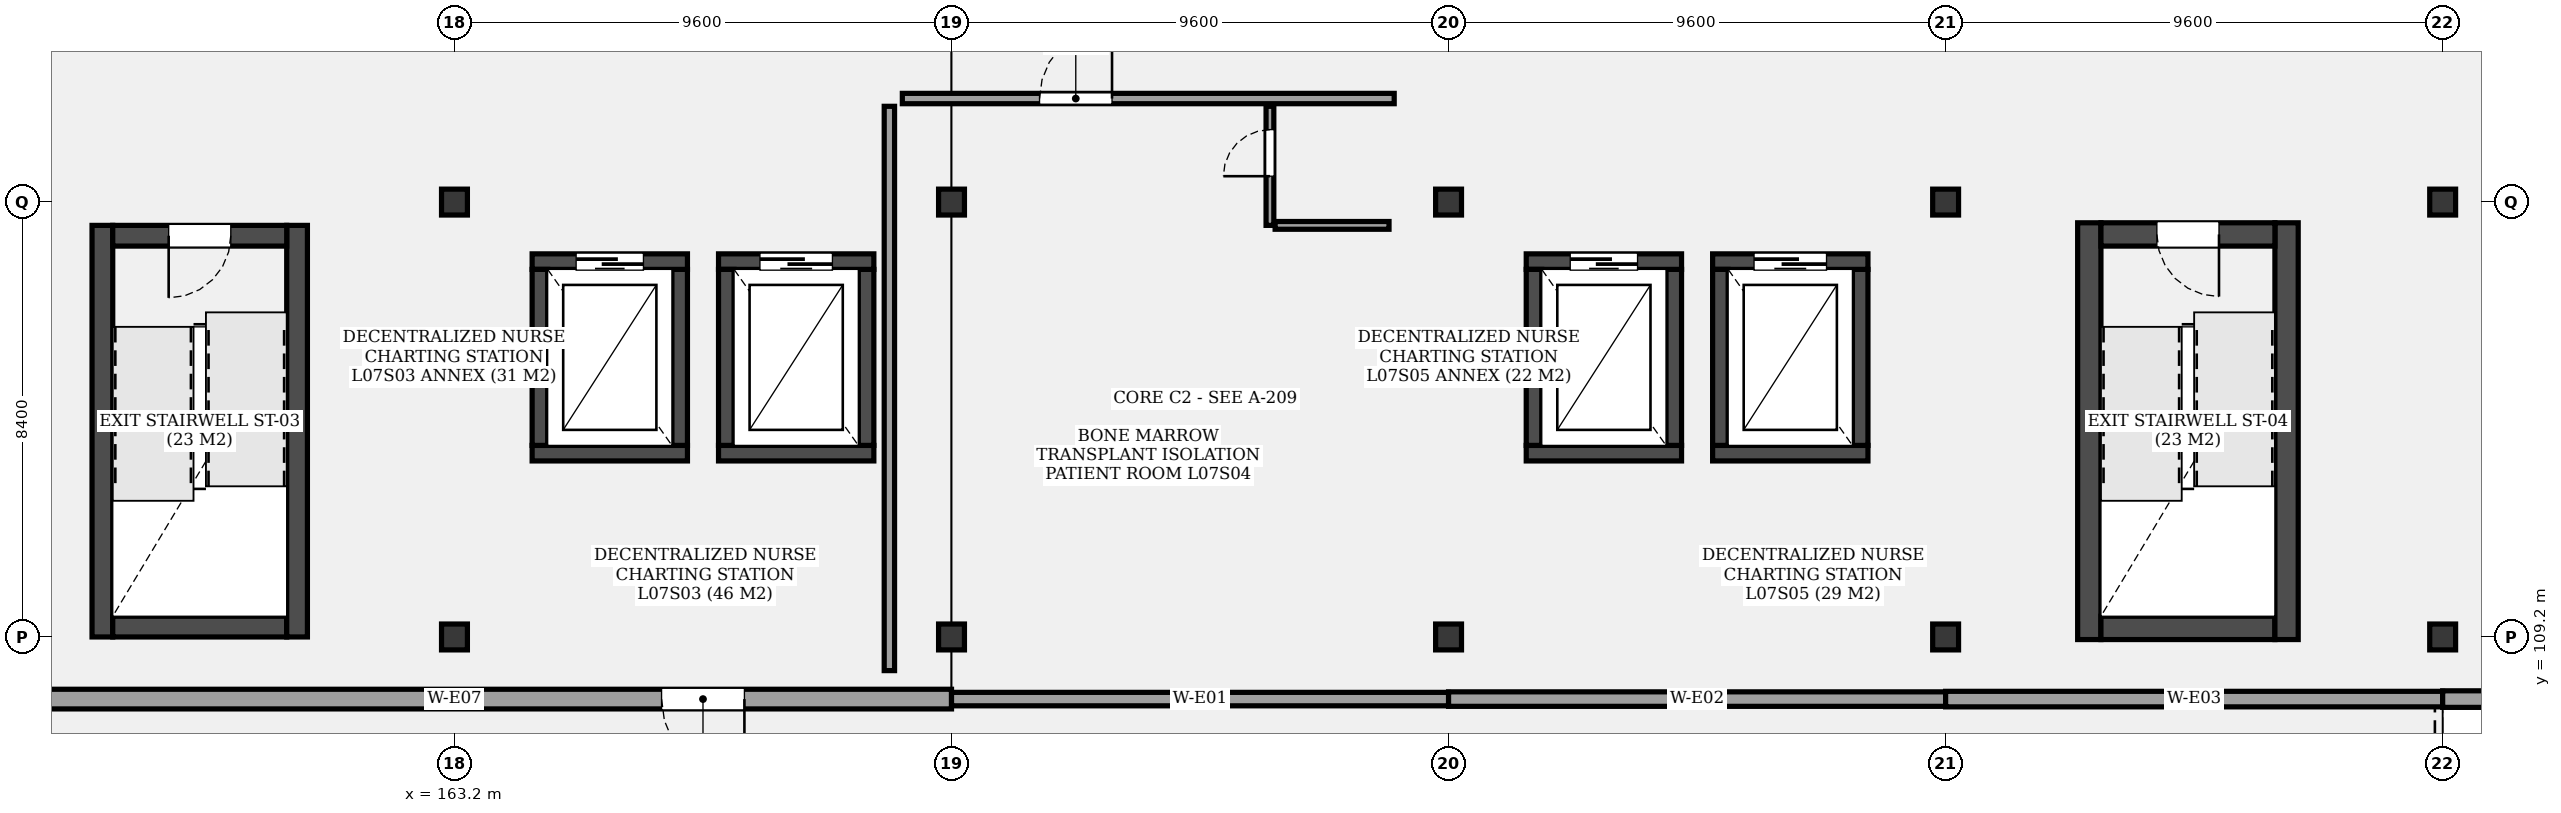
"""IFC4 building model, lengths in metres.
Left out: names, types, materials, properties, quantities, classifications, styles, units other than length and angle.
Written with IfcOpenShell. Run it as: python <this file> out.ifc"""

import sys

from ifc_helpers import new_model, si_unit, direction, frame, frame_2d, origin, origin_2d, place, context, subcontext, project, spatial, rectangle, extrude, element, fill, save


model = new_model("IFC4")
c1 = context("Model", 3, precision=1e-05, world=origin(), true_north=direction((0.0, 1.0)))
c2 = subcontext(c1, "Body", "Model", "MODEL_VIEW")
j1 = project(units=[si_unit("LENGTHUNIT", "METRE"), si_unit("PLANEANGLEUNIT", "RADIAN")], contexts=[c1])
p1 = place(None, origin())
s1 = spatial("IfcSite", under=j1, at=p1, CompositionType="ELEMENT")
p2 = place(p1, origin())
s2 = spatial("IfcBuilding", under=s1, at=p2, CompositionType="ELEMENT")
p3 = place(p2, frame((0.0, 0.0, 30.4)))
s3 = spatial("IfcBuildingStorey", under=s2, at=p3, CompositionType="ELEMENT", Elevation=30.4)
for number, where, z_axis, x_axis in (
    (1, (163.2, 109.2, 0.0), (0.0, 0.0, 1.0), (1.0, 0.0, 0.0)),
    (2, (163.2, 117.6, 0.0), (0.0, 0.0, 1.0), (1.0, 0.0, 0.0)),
    (3, (172.8, 109.2, 0.0), (0.0, 0.0, 1.0), (1.0, 0.0, 0.0)),
    (4, (172.8, 117.6, 0.0), (0.0, 0.0, 1.0), (1.0, 0.0, 0.0)),
    (5, (182.4, 109.2, 0.0), (0.0, 0.0, 1.0), (1.0, 0.0, 0.0)),
    (6, (182.4, 117.6, 0.0), (0.0, 0.0, 1.0), (1.0, 0.0, 0.0)),
    (7, (192.0, 109.2, 0.0), (0.0, 0.0, 1.0), (1.0, 0.0, 0.0)),
    (8, (192.0, 117.6, 0.0), (0.0, 0.0, 1.0), (1.0, 0.0, 0.0)),
    (9, (201.6, 109.2, 0.0), (0.0, 0.0, 1.0), (1.0, 0.0, 0.0)),
    (10, (201.6, 117.6, 0.0), (0.0, 0.0, 1.0), (1.0, 0.0, 0.0)),
):
    element("IfcColumn", number, at=place(p3, frame(where, z_axis=z_axis, x_axis=x_axis)), inside=s3, PredefinedType="COLUMN", context=c2, shape_type="SweptSolid", body=[
        extrude(rectangle(XDim=0.5, YDim=0.5, at=origin_2d()), origin(), (0.0, 0.0, 1.0), 4.2),
    ])
p4 = place(p3, frame((156.4, 117.15, 0.0), z_axis=(0.0, 0.0, 1.0), x_axis=(0.0, -1.0, 0.0)))
e11 = element("IfcWall", 11, at=p4, inside=s3, PredefinedType="SHEAR", context=c2, shape_type="SweptSolid", body=[
    extrude(rectangle(XDim=7.95, YDim=0.4, at=frame_2d((3.975, 0.0))), origin(), (0.0, 0.0, 1.0), 4.2),
])
p5 = place(p3, frame((156.6, 109.4, 0.0), z_axis=(0.0, 0.0, 1.0), x_axis=(1.0, 0.0, 0.0)))
e12 = element("IfcWall", 12, at=p5, inside=s3, PredefinedType="SHEAR", context=c2, shape_type="SweptSolid", body=[
    extrude(rectangle(XDim=3.36, YDim=0.4, at=frame_2d((1.68, 0.0))), origin(), (0.0, 0.0, 1.0), 4.2),
])
p6 = place(p3, frame((160.16, 109.2, 0.0), z_axis=(0.0, 0.0, 1.0), x_axis=(0.0, 1.0, 0.0)))
e13 = element("IfcWall", 13, at=p6, inside=s3, PredefinedType="SHEAR", context=c2, shape_type="SweptSolid", body=[
    extrude(rectangle(XDim=7.95, YDim=0.4, at=frame_2d((3.975, 0.0))), origin(), (0.0, 0.0, 1.0), 4.2),
])
p7 = place(p3, frame((159.96, 116.95, 0.0), z_axis=(0.0, 0.0, 1.0), x_axis=(-1.0, 0.0, 0.0)))
e14 = element("IfcWall", 14, at=p7, inside=s3, PredefinedType="SHEAR", context=c2, shape_type="SweptSolid", body=[
    extrude(rectangle(XDim=3.36, YDim=0.4, at=frame_2d((1.68, 0.0))), origin(), (0.0, 0.0, 1.0), 4.2),
])
p8 = place(p7, frame((1.08, 0.0, 0.0)))
e15 = element("IfcOpeningElement", 15, at=p8, cuts=e14, PredefinedType="OPENING", context=c2, shape_type="SweptSolid", body=[
    extrude(rectangle(XDim=1.2, YDim=2.2, at=frame_2d((0.6, 1.1))), frame((0.0, 0.21, 0.0), z_axis=(0.0, -1.0, 0.0), x_axis=(1.0, 0.0, 0.0)), (0.0, 0.0, 1.0), 0.42),
])
p9 = place(p3, frame((194.775, 117.2, 0.0), z_axis=(0.0, 0.0, 1.0), x_axis=(0.0, -1.0, 0.0)))
e16 = element("IfcWall", 16, at=p9, inside=s3, PredefinedType="SHEAR", context=c2, shape_type="SweptSolid", body=[
    extrude(rectangle(XDim=8.05, YDim=0.45, at=frame_2d((4.025, 0.0))), origin(), (0.0, 0.0, 1.0), 4.2),
])
p10 = place(p3, frame((195.0, 109.375, 0.0), z_axis=(0.0, 0.0, 1.0), x_axis=(1.0, 0.0, 0.0)))
e17 = element("IfcWall", 17, at=p10, inside=s3, PredefinedType="SHEAR", context=c2, shape_type="SweptSolid", body=[
    extrude(rectangle(XDim=3.36, YDim=0.45, at=frame_2d((1.68, 0.0))), origin(), (0.0, 0.0, 1.0), 4.2),
])
p11 = place(p3, frame((198.585, 109.15, 0.0), z_axis=(0.0, 0.0, 1.0), x_axis=(0.0, 1.0, 0.0)))
e18 = element("IfcWall", 18, at=p11, inside=s3, PredefinedType="SHEAR", context=c2, shape_type="SweptSolid", body=[
    extrude(rectangle(XDim=8.05, YDim=0.45, at=frame_2d((4.025, 0.0))), origin(), (0.0, 0.0, 1.0), 4.2),
])
p12 = place(p3, frame((198.36, 116.975, 0.0), z_axis=(0.0, 0.0, 1.0), x_axis=(-1.0, 0.0, 0.0)))
e19 = element("IfcWall", 19, at=p12, inside=s3, PredefinedType="SHEAR", context=c2, shape_type="SweptSolid", body=[
    extrude(rectangle(XDim=3.36, YDim=0.45, at=frame_2d((1.68, 0.0))), origin(), (0.0, 0.0, 1.0), 4.2),
])
p13 = place(p12, frame((1.08, 0.0, 0.0)))
e20 = element("IfcOpeningElement", 20, at=p13, cuts=e19, PredefinedType="OPENING", context=c2, shape_type="SweptSolid", body=[
    extrude(rectangle(XDim=1.2, YDim=2.2, at=frame_2d((0.6, 1.1))), frame((0.0, 0.235, 0.0), z_axis=(0.0, -1.0, 0.0), x_axis=(1.0, 0.0, 0.0)), (0.0, 0.0, 1.0), 0.47),
])
p14 = place(p3, frame((164.7, 112.75, 0.0), z_axis=(0.0, 0.0, 1.0), x_axis=(1.0, 0.0, 0.0)))
e21 = element("IfcWall", 21, at=p14, inside=s3, PredefinedType="SHEAR", context=c2, shape_type="SweptSolid", body=[
    extrude(rectangle(XDim=3.0, YDim=0.3, at=frame_2d((1.5, 0.0))), origin(), (0.0, 0.0, 1.0), 4.2),
])
p15 = place(p3, frame((167.55, 112.9, 0.0), z_axis=(0.0, 0.0, 1.0), x_axis=(0.0, 1.0, 0.0)))
e22 = element("IfcWall", 22, at=p15, inside=s3, PredefinedType="SHEAR", context=c2, shape_type="SweptSolid", body=[
    extrude(rectangle(XDim=3.4, YDim=0.3, at=frame_2d((1.7, 0.0))), origin(), (0.0, 0.0, 1.0), 4.2),
])
p16 = place(p3, frame((167.7, 116.45, 0.0), z_axis=(0.0, 0.0, 1.0), x_axis=(-1.0, 0.0, 0.0)))
e23 = element("IfcWall", 23, at=p16, inside=s3, PredefinedType="SHEAR", context=c2, shape_type="SweptSolid", body=[
    extrude(rectangle(XDim=3.0, YDim=0.3, at=frame_2d((1.5, 0.0))), origin(), (0.0, 0.0, 1.0), 4.2),
])
p17 = place(p16, frame((0.85, 0.0, 0.0)))
e24 = element("IfcOpeningElement", 24, at=p17, cuts=e23, PredefinedType="OPENING", context=c2, shape_type="SweptSolid", body=[
    extrude(rectangle(XDim=1.3, YDim=2.3, at=frame_2d((0.65, 1.15))), frame((0.0, 0.16, 0.0), z_axis=(0.0, -1.0, 0.0), x_axis=(1.0, 0.0, 0.0)), (0.0, 0.0, 1.0), 0.32),
])
p18 = place(p3, frame((164.85, 116.3, 0.0), z_axis=(0.0, 0.0, 1.0), x_axis=(0.0, -1.0, 0.0)))
e25 = element("IfcWall", 25, at=p18, inside=s3, PredefinedType="SHEAR", context=c2, shape_type="SweptSolid", body=[
    extrude(rectangle(XDim=3.4, YDim=0.3, at=frame_2d((1.7, 0.0))), origin(), (0.0, 0.0, 1.0), 4.2),
])
p19 = place(p3, frame((168.3, 112.75, 0.0), z_axis=(0.0, 0.0, 1.0), x_axis=(1.0, 0.0, 0.0)))
e26 = element("IfcWall", 26, at=p19, inside=s3, PredefinedType="SHEAR", context=c2, shape_type="SweptSolid", body=[
    extrude(rectangle(XDim=3.0, YDim=0.3, at=frame_2d((1.5, 0.0))), origin(), (0.0, 0.0, 1.0), 4.2),
])
p20 = place(p3, frame((171.15, 112.9, 0.0), z_axis=(0.0, 0.0, 1.0), x_axis=(0.0, 1.0, 0.0)))
e27 = element("IfcWall", 27, at=p20, inside=s3, PredefinedType="SHEAR", context=c2, shape_type="SweptSolid", body=[
    extrude(rectangle(XDim=3.4, YDim=0.3, at=frame_2d((1.7, 0.0))), origin(), (0.0, 0.0, 1.0), 4.2),
])
p21 = place(p3, frame((171.3, 116.45, 0.0), z_axis=(0.0, 0.0, 1.0), x_axis=(-1.0, 0.0, 0.0)))
e28 = element("IfcWall", 28, at=p21, inside=s3, PredefinedType="SHEAR", context=c2, shape_type="SweptSolid", body=[
    extrude(rectangle(XDim=3.0, YDim=0.3, at=frame_2d((1.5, 0.0))), origin(), (0.0, 0.0, 1.0), 4.2),
])
p22 = place(p21, frame((0.8, 0.0, 0.0)))
e29 = element("IfcOpeningElement", 29, at=p22, cuts=e28, PredefinedType="OPENING", context=c2, shape_type="SweptSolid", body=[
    extrude(rectangle(XDim=1.4, YDim=2.3, at=frame_2d((0.7, 1.15))), frame((0.0, 0.16, 0.0), z_axis=(0.0, -1.0, 0.0), x_axis=(1.0, 0.0, 0.0)), (0.0, 0.0, 1.0), 0.32),
])
p23 = place(p3, frame((168.45, 116.3, 0.0), z_axis=(0.0, 0.0, 1.0), x_axis=(0.0, -1.0, 0.0)))
e30 = element("IfcWall", 30, at=p23, inside=s3, PredefinedType="SHEAR", context=c2, shape_type="SweptSolid", body=[
    extrude(rectangle(XDim=3.4, YDim=0.3, at=frame_2d((1.7, 0.0))), origin(), (0.0, 0.0, 1.0), 4.2),
])
p24 = place(p3, frame((183.9, 112.75, 0.0), z_axis=(0.0, 0.0, 1.0), x_axis=(1.0, 0.0, 0.0)))
e31 = element("IfcWall", 31, at=p24, inside=s3, PredefinedType="SHEAR", context=c2, shape_type="SweptSolid", body=[
    extrude(rectangle(XDim=3.0, YDim=0.3, at=frame_2d((1.5, 0.0))), origin(), (0.0, 0.0, 1.0), 4.2),
])
p25 = place(p3, frame((186.75, 112.9, 0.0), z_axis=(0.0, 0.0, 1.0), x_axis=(0.0, 1.0, 0.0)))
e32 = element("IfcWall", 32, at=p25, inside=s3, PredefinedType="SHEAR", context=c2, shape_type="SweptSolid", body=[
    extrude(rectangle(XDim=3.4, YDim=0.3, at=frame_2d((1.7, 0.0))), origin(), (0.0, 0.0, 1.0), 4.2),
])
p26 = place(p3, frame((186.9, 116.45, 0.0), z_axis=(0.0, 0.0, 1.0), x_axis=(-1.0, 0.0, 0.0)))
e33 = element("IfcWall", 33, at=p26, inside=s3, PredefinedType="SHEAR", context=c2, shape_type="SweptSolid", body=[
    extrude(rectangle(XDim=3.0, YDim=0.3, at=frame_2d((1.5, 0.0))), origin(), (0.0, 0.0, 1.0), 4.2),
])
p27 = place(p26, frame((0.85, 0.0, 0.0)))
e34 = element("IfcOpeningElement", 34, at=p27, cuts=e33, PredefinedType="OPENING", context=c2, shape_type="SweptSolid", body=[
    extrude(rectangle(XDim=1.3, YDim=2.3, at=frame_2d((0.65, 1.15))), frame((0.0, 0.16, 0.0), z_axis=(0.0, -1.0, 0.0), x_axis=(1.0, 0.0, 0.0)), (0.0, 0.0, 1.0), 0.32),
])
p28 = place(p3, frame((184.05, 116.3, 0.0), z_axis=(0.0, 0.0, 1.0), x_axis=(0.0, -1.0, 0.0)))
e35 = element("IfcWall", 35, at=p28, inside=s3, PredefinedType="SHEAR", context=c2, shape_type="SweptSolid", body=[
    extrude(rectangle(XDim=3.4, YDim=0.3, at=frame_2d((1.7, 0.0))), origin(), (0.0, 0.0, 1.0), 4.2),
])
p29 = place(p3, frame((187.5, 112.75, 0.0), z_axis=(0.0, 0.0, 1.0), x_axis=(1.0, 0.0, 0.0)))
e36 = element("IfcWall", 36, at=p29, inside=s3, PredefinedType="SHEAR", context=c2, shape_type="SweptSolid", body=[
    extrude(rectangle(XDim=3.0, YDim=0.3, at=frame_2d((1.5, 0.0))), origin(), (0.0, 0.0, 1.0), 4.2),
])
p30 = place(p3, frame((190.35, 112.9, 0.0), z_axis=(0.0, 0.0, 1.0), x_axis=(0.0, 1.0, 0.0)))
e37 = element("IfcWall", 37, at=p30, inside=s3, PredefinedType="SHEAR", context=c2, shape_type="SweptSolid", body=[
    extrude(rectangle(XDim=3.4, YDim=0.3, at=frame_2d((1.7, 0.0))), origin(), (0.0, 0.0, 1.0), 4.2),
])
p31 = place(p3, frame((190.5, 116.45, 0.0), z_axis=(0.0, 0.0, 1.0), x_axis=(-1.0, 0.0, 0.0)))
e38 = element("IfcWall", 38, at=p31, inside=s3, PredefinedType="SHEAR", context=c2, shape_type="SweptSolid", body=[
    extrude(rectangle(XDim=3.0, YDim=0.3, at=frame_2d((1.5, 0.0))), origin(), (0.0, 0.0, 1.0), 4.2),
])
p32 = place(p31, frame((0.8, 0.0, 0.0)))
e39 = element("IfcOpeningElement", 39, at=p32, cuts=e38, PredefinedType="OPENING", context=c2, shape_type="SweptSolid", body=[
    extrude(rectangle(XDim=1.4, YDim=2.3, at=frame_2d((0.7, 1.15))), frame((0.0, 0.16, 0.0), z_axis=(0.0, -1.0, 0.0), x_axis=(1.0, 0.0, 0.0)), (0.0, 0.0, 1.0), 0.32),
])
p33 = place(p3, frame((187.65, 116.3, 0.0), z_axis=(0.0, 0.0, 1.0), x_axis=(0.0, -1.0, 0.0)))
e40 = element("IfcWall", 40, at=p33, inside=s3, PredefinedType="SHEAR", context=c2, shape_type="SweptSolid", body=[
    extrude(rectangle(XDim=3.4, YDim=0.3, at=frame_2d((1.7, 0.0))), origin(), (0.0, 0.0, 1.0), 4.2),
])
p34 = place(p3, frame((172.8, 108.0, 0.0), z_axis=(0.0, 0.0, 1.0), x_axis=(-1.0, 0.0, 0.0)))
e41 = element("IfcWall", 41, at=p34, inside=s3, PredefinedType="SOLIDWALL", context=c2, shape_type="SweptSolid", body=[
    extrude(rectangle(XDim=19.2, YDim=0.38, at=frame_2d((9.6, 0.0))), origin(), (0.0, 0.0, 1.0), 2.58),
])
p35 = place(p34, frame((4.0, 0.0, 0.0)))
e42 = element("IfcOpeningElement", 42, at=p35, cuts=e41, PredefinedType="OPENING", context=c2, shape_type="SweptSolid", body=[
    extrude(rectangle(XDim=1.6, YDim=2.3, at=frame_2d((0.8, 1.15))), frame((0.0, 0.2, 0.0), z_axis=(0.0, -1.0, 0.0), x_axis=(1.0, 0.0, 0.0)), (0.0, 0.0, 1.0), 0.4),
])
p36 = place(p3, frame((182.4, 108.0, 0.0), z_axis=(0.0, 0.0, 1.0), x_axis=(-1.0, 0.0, 0.0)))
e43 = element("IfcWall", 43, at=p36, inside=s3, PredefinedType="SOLIDWALL", context=c2, shape_type="SweptSolid", body=[
    extrude(rectangle(XDim=9.6, YDim=0.26, at=frame_2d((4.8, 0.0))), origin(), (0.0, 0.0, 1.0), 2.58),
])
p37 = place(p3, frame((192.0, 108.0, 0.0), z_axis=(0.0, 0.0, 1.0), x_axis=(-1.0, 0.0, 0.0)))
e44 = element("IfcWall", 44, at=p37, inside=s3, PredefinedType="SOLIDWALL", context=c2, shape_type="SweptSolid", body=[
    extrude(rectangle(XDim=9.6, YDim=0.28, at=frame_2d((4.8, 0.0))), origin(), (0.0, 0.0, 1.0), 2.58),
])
p38 = place(p3, frame((201.6, 108.0, 0.0), z_axis=(0.0, 0.0, 1.0), x_axis=(-1.0, 0.0, 0.0)))
e45 = element("IfcWall", 45, at=p38, inside=s3, PredefinedType="SOLIDWALL", context=c2, shape_type="SweptSolid", body=[
    extrude(rectangle(XDim=9.6, YDim=0.3, at=frame_2d((4.8, 0.0))), origin(), (0.0, 0.0, 1.0), 2.58),
])
p39 = place(p3, frame((211.2, 108.0, 0.0), z_axis=(0.0, 0.0, 1.0), x_axis=(-1.0, 0.0, 0.0)))
e46 = element("IfcWall", 46, at=p39, inside=s3, PredefinedType="SOLIDWALL", context=c2, shape_type="SweptSolid", body=[
    extrude(rectangle(XDim=9.6, YDim=0.32, at=frame_2d((4.8, 0.0))), origin(), (0.0, 0.0, 1.0), 2.58),
])
p40 = place(p3, frame((171.85, 119.6, 0.0), z_axis=(0.0, 0.0, 1.0), x_axis=(1.0, 0.0, 0.0)))
e47 = element("IfcWall", 47, at=p40, inside=s3, PredefinedType="PARTITIONING", context=c2, shape_type="SweptSolid", body=[
    extrude(rectangle(XDim=9.5, YDim=0.2, at=frame_2d((4.75, 0.0))), origin(), (0.0, 0.0, 1.0), 2.58),
])
p41 = place(p40, frame((2.65, 0.0, 0.0)))
e48 = element("IfcOpeningElement", 48, at=p41, cuts=e47, PredefinedType="OPENING", context=c2, shape_type="SweptSolid", body=[
    extrude(rectangle(XDim=1.4, YDim=2.4, at=frame_2d((0.7, 1.2))), frame((0.0, 0.11, 0.0), z_axis=(0.0, -1.0, 0.0), x_axis=(1.0, 0.0, 0.0)), (0.0, 0.0, 1.0), 0.22),
])
p42 = place(p3, frame((178.95, 117.15, 0.0), z_axis=(0.0, 0.0, 1.0), x_axis=(0.0, 1.0, 0.0)))
e49 = element("IfcWall", 49, at=p42, inside=s3, PredefinedType="PARTITIONING", context=c2, shape_type="SweptSolid", body=[
    extrude(rectangle(XDim=2.3, YDim=0.15, at=frame_2d((1.15, 0.0))), origin(), (0.0, 0.0, 1.0), 2.58),
])
p43 = place(p42, frame((0.95, 0.0, 0.0)))
e50 = element("IfcOpeningElement", 50, at=p43, cuts=e49, PredefinedType="OPENING", context=c2, shape_type="SweptSolid", body=[
    extrude(rectangle(XDim=0.9, YDim=2.1, at=frame_2d((0.45, 1.05))), frame((0.0, 0.085, 0.0), z_axis=(0.0, -1.0, 0.0), x_axis=(1.0, 0.0, 0.0)), (0.0, 0.0, 1.0), 0.17),
])
p44 = place(p3, frame((179.05, 117.15, 0.0), z_axis=(0.0, 0.0, 1.0), x_axis=(1.0, 0.0, 0.0)))
e51 = element("IfcWall", 51, at=p44, inside=s3, PredefinedType="PARTITIONING", context=c2, shape_type="SweptSolid", body=[
    extrude(rectangle(XDim=2.2, YDim=0.15, at=frame_2d((1.1, 0.0))), origin(), (0.0, 0.0, 1.0), 2.58),
])
p45 = place(p3, frame((171.6, 108.55, 0.0), z_axis=(0.0, 0.0, 1.0), x_axis=(0.0, 1.0, 0.0)))
e52 = element("IfcWall", 52, at=p45, inside=s3, PredefinedType="PARTITIONING", context=c2, shape_type="SweptSolid", body=[
    extrude(rectangle(XDim=10.9, YDim=0.2, at=frame_2d((5.45, 0.0))), origin(), (0.0, 0.0, 1.0), 2.58),
])
p46 = place(p8, origin())
e53 = element("IfcDoor", 53, at=p46, inside=s3, OperationType="SINGLE_SWING_RIGHT", PredefinedType="DOOR", context=c2, shape_type="SweptSolid", body=[
    extrude(rectangle(XDim=1.2, YDim=2.2, at=frame_2d((0.6, 1.1))), frame((0.0, 0.025, 0.0), z_axis=(0.0, -1.0, 0.0), x_axis=(1.0, 0.0, 0.0)), (0.0, 0.0, 1.0), 0.05),
])
fill(e15, e53)
p47 = place(p13, origin())
e54 = element("IfcDoor", 54, at=p47, inside=s3, OperationType="SINGLE_SWING_LEFT", PredefinedType="DOOR", context=c2, shape_type="SweptSolid", body=[
    extrude(rectangle(XDim=1.2, YDim=2.2, at=frame_2d((0.6, 1.1))), frame((0.0, 0.025, 0.0), z_axis=(0.0, -1.0, 0.0), x_axis=(1.0, 0.0, 0.0)), (0.0, 0.0, 1.0), 0.05),
])
fill(e20, e54)
p48 = place(p17, origin())
e55 = element("IfcDoor", 55, at=p48, inside=s3, OperationType="SLIDING_TO_RIGHT", PredefinedType="DOOR", context=c2, shape_type="SweptSolid", body=[
    extrude(rectangle(XDim=1.3, YDim=2.3, at=frame_2d((0.65, 1.15))), frame((0.0, 0.025, 0.0), z_axis=(0.0, -1.0, 0.0), x_axis=(1.0, 0.0, 0.0)), (0.0, 0.0, 1.0), 0.05),
])
fill(e24, e55)
p49 = place(p22, origin())
e56 = element("IfcDoor", 56, at=p49, inside=s3, OperationType="SLIDING_TO_LEFT", PredefinedType="DOOR", context=c2, shape_type="SweptSolid", body=[
    extrude(rectangle(XDim=1.4, YDim=2.3, at=frame_2d((0.7, 1.15))), frame((0.0, 0.025, 0.0), z_axis=(0.0, -1.0, 0.0), x_axis=(1.0, 0.0, 0.0)), (0.0, 0.0, 1.0), 0.05),
])
fill(e29, e56)
p50 = place(p27, origin())
e57 = element("IfcDoor", 57, at=p50, inside=s3, OperationType="SLIDING_TO_RIGHT", PredefinedType="DOOR", context=c2, shape_type="SweptSolid", body=[
    extrude(rectangle(XDim=1.3, YDim=2.3, at=frame_2d((0.65, 1.15))), frame((0.0, 0.025, 0.0), z_axis=(0.0, -1.0, 0.0), x_axis=(1.0, 0.0, 0.0)), (0.0, 0.0, 1.0), 0.05),
])
fill(e34, e57)
p51 = place(p32, origin())
e58 = element("IfcDoor", 58, at=p51, inside=s3, OperationType="SLIDING_TO_RIGHT", PredefinedType="DOOR", context=c2, shape_type="SweptSolid", body=[
    extrude(rectangle(XDim=1.4, YDim=2.3, at=frame_2d((0.7, 1.15))), frame((0.0, 0.025, 0.0), z_axis=(0.0, -1.0, 0.0), x_axis=(1.0, 0.0, 0.0)), (0.0, 0.0, 1.0), 0.05),
])
fill(e39, e58)
p52 = place(p35, origin())
e59 = element("IfcDoor", 59, at=p52, inside=s3, OperationType="SINGLE_SWING_LEFT", PredefinedType="DOOR", context=c2, shape_type="SweptSolid", body=[
    extrude(rectangle(XDim=1.6, YDim=2.3, at=frame_2d((0.8, 1.15))), frame((0.0, 0.025, 0.0), z_axis=(0.0, -1.0, 0.0), x_axis=(1.0, 0.0, 0.0)), (0.0, 0.0, 1.0), 0.05),
])
fill(e42, e59)
p53 = place(p41, origin())
e60 = element("IfcDoor", 60, at=p53, inside=s3, OperationType="SINGLE_SWING_RIGHT", PredefinedType="DOOR", context=c2, shape_type="SweptSolid", body=[
    extrude(rectangle(XDim=1.4, YDim=2.4, at=frame_2d((0.7, 1.2))), frame((0.0, 0.025, 0.0), z_axis=(0.0, -1.0, 0.0), x_axis=(1.0, 0.0, 0.0)), (0.0, 0.0, 1.0), 0.05),
])
fill(e48, e60)
p54 = place(p43, origin())
e61 = element("IfcDoor", 61, at=p54, inside=s3, OperationType="SINGLE_SWING_LEFT", PredefinedType="DOOR", context=c2, shape_type="SweptSolid", body=[
    extrude(rectangle(XDim=0.9, YDim=2.1, at=frame_2d((0.45, 1.05))), frame((0.0, 0.025, 0.0), z_axis=(0.0, -1.0, 0.0), x_axis=(1.0, 0.0, 0.0)), (0.0, 0.0, 1.0), 0.05),
])
fill(e50, e61)
save(model, sys.argv[1])
